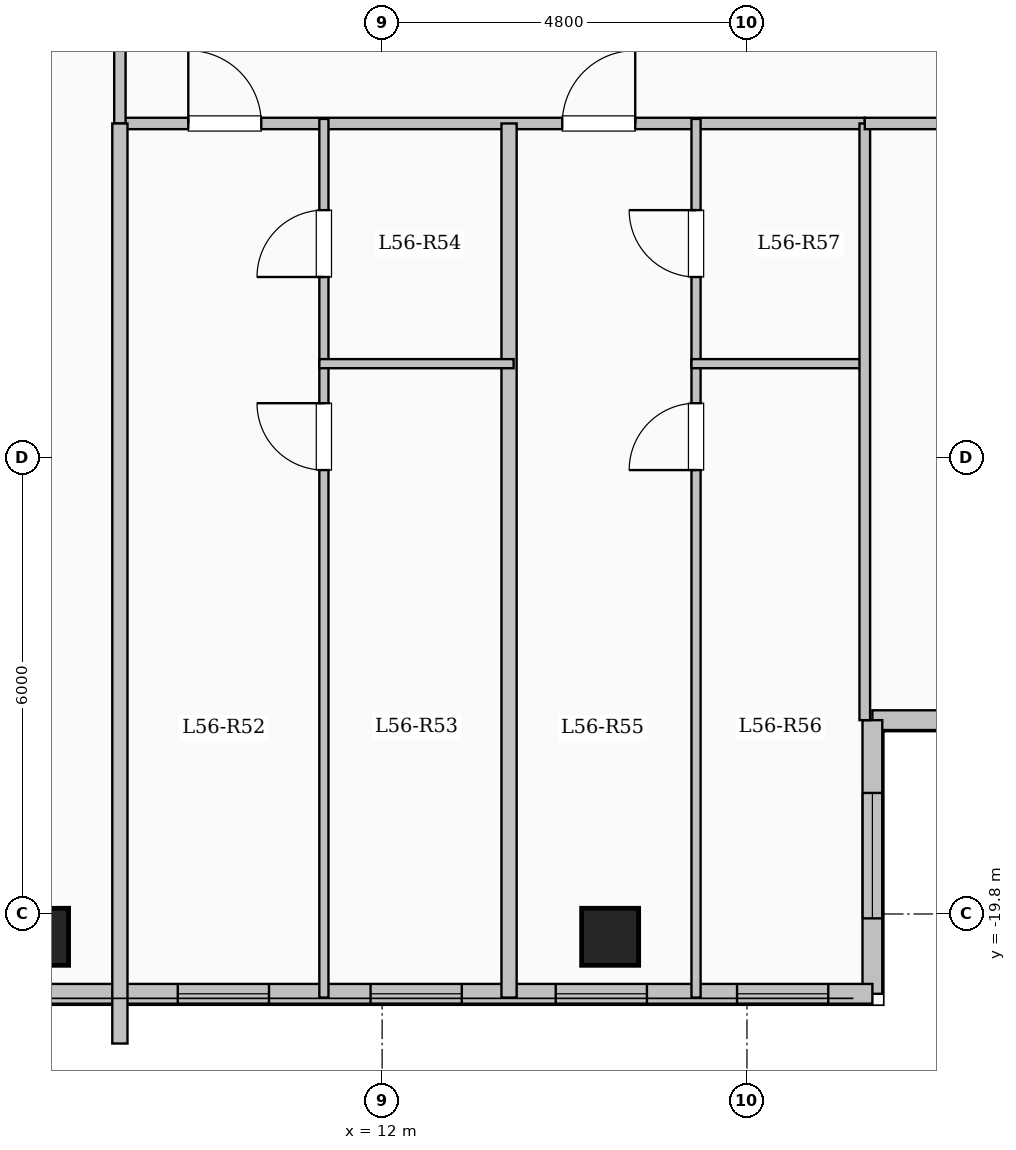
"""IFC4 building model, lengths in metres.
Left out: names, types, materials, properties, quantities, classifications, styles, units other than length and angle.
Written with IfcOpenShell. Run it as: python <this file> out.ifc"""

import sys

from ifc_helpers import new_model, si_unit, direction, frame, frame_2d, origin, origin_2d, place, context, subcontext, project, spatial, rectangle, extrude, element, fill, save


model = new_model("IFC4")
c1 = context("Model", 3, precision=1e-05, world=origin(), true_north=direction((0.0, 1.0)))
c2 = subcontext(c1, "Body", "Model", "MODEL_VIEW")
j1 = project(units=[si_unit("LENGTHUNIT", "METRE"), si_unit("PLANEANGLEUNIT", "RADIAN")], contexts=[c1])
p1 = place(None, origin())
s1 = spatial("IfcSite", under=j1, at=p1, CompositionType="ELEMENT")
p2 = place(p1, origin())
s2 = spatial("IfcBuilding", under=s1, at=p2, CompositionType="ELEMENT")
p3 = place(p2, frame((0.0, 0.0, 207.0)))
s3 = spatial("IfcBuildingStorey", under=s2, at=p3, CompositionType="ELEMENT", Elevation=207.0)
for number, where, z_axis, x_axis in (
    (1, (7.5, -20.1, 0.0), (0.0, 0.0, 1.0), (1.0, 0.0, 0.0)),
    (2, (15.0, -20.1, 0.0), (0.0, 0.0, 1.0), (1.0, 0.0, 0.0)),
):
    element("IfcColumn", number, at=place(p3, frame(where, z_axis=z_axis, x_axis=x_axis)), inside=s3, PredefinedType="COLUMN", context=c2, shape_type="SweptSolid", body=[
        extrude(rectangle(XDim=0.75, YDim=0.75, at=origin_2d()), origin(), (0.0, 0.0, 1.0), 3.35),
    ])
p4 = place(p3, frame((23.55, -17.25, 0.0), z_axis=(0.0, 0.0, 1.0), x_axis=(-1.0, 0.0, 0.0)))
e3 = element("IfcWall", 3, at=p4, inside=s3, PredefinedType="SOLIDWALL", context=c2, shape_type="SweptSolid", body=[
    extrude(rectangle(XDim=5.1, YDim=0.26, at=frame_2d((2.55, 0.0))), origin(), (0.0, 0.0, 1.0), 3.1),
])
p5 = place(p4, frame((1.475, 0.0, 0.9)))
e4 = element("IfcOpeningElement", 4, at=p5, cuts=e3, PredefinedType="OPENING", context=c2, shape_type="SweptSolid", body=[
    extrude(rectangle(XDim=2.2, YDim=1.75, at=frame_2d((1.1, 0.875))), frame((0.0, 0.14, 0.0), z_axis=(0.0, -1.0, 0.0), x_axis=(1.0, 0.0, 0.0)), (0.0, 0.0, 1.0), 0.28),
])
p6 = place(p3, frame((18.45, -17.25, 0.0), z_axis=(0.0, 0.0, 1.0), x_axis=(0.0, -1.0, 0.0)))
e5 = element("IfcWall", 5, at=p6, inside=s3, PredefinedType="SOLIDWALL", context=c2, shape_type="SweptSolid", body=[
    extrude(rectangle(XDim=3.6, YDim=0.26, at=frame_2d((1.8, 0.0))), origin(), (0.0, 0.0, 1.0), 3.1),
])
p7 = place(p6, frame((0.958, 0.0, 0.9)))
e6 = element("IfcOpeningElement", 6, at=p7, cuts=e5, PredefinedType="OPENING", context=c2, shape_type="SweptSolid", body=[
    extrude(rectangle(XDim=1.65, YDim=1.6, at=frame_2d((0.825, 0.8))), frame((0.0, 0.14, 0.0), z_axis=(0.0, -1.0, 0.0), x_axis=(1.0, 0.0, 0.0)), (0.0, 0.0, 1.0), 0.28),
])
p8 = place(p3, frame((18.45, -20.85, 0.0), z_axis=(0.0, 0.0, 1.0), x_axis=(-1.0, 0.0, 0.0)))
e7 = element("IfcWall", 7, at=p8, inside=s3, PredefinedType="SOLIDWALL", context=c2, shape_type="SweptSolid", body=[
    extrude(rectangle(XDim=11.1, YDim=0.26, at=frame_2d((5.55, 0.0))), origin(), (0.0, 0.0, 1.0), 3.1),
])
p9 = place(p8, frame((0.581, 0.0, 0.95)))
e8 = element("IfcOpeningElement", 8, at=p9, cuts=e7, PredefinedType="OPENING", context=c2, shape_type="SweptSolid", body=[
    extrude(rectangle(XDim=1.2, YDim=1.5, at=frame_2d((0.6, 0.75))), frame((0.0, 0.14, 0.0), z_axis=(0.0, -1.0, 0.0), x_axis=(1.0, 0.0, 0.0)), (0.0, 0.0, 1.0), 0.28),
])
p10 = place(p8, frame((2.966, 0.0, 0.95)))
e9 = element("IfcOpeningElement", 9, at=p10, cuts=e7, PredefinedType="OPENING", context=c2, shape_type="SweptSolid", body=[
    extrude(rectangle(XDim=1.2, YDim=1.5, at=frame_2d((0.6, 0.75))), frame((0.0, 0.14, 0.0), z_axis=(0.0, -1.0, 0.0), x_axis=(1.0, 0.0, 0.0)), (0.0, 0.0, 1.0), 0.28),
])
p11 = place(p8, frame((5.402, 0.0, 0.95)))
e10 = element("IfcOpeningElement", 10, at=p11, cuts=e7, PredefinedType="OPENING", context=c2, shape_type="SweptSolid", body=[
    extrude(rectangle(XDim=1.2, YDim=1.5, at=frame_2d((0.6, 0.75))), frame((0.0, 0.14, 0.0), z_axis=(0.0, -1.0, 0.0), x_axis=(1.0, 0.0, 0.0)), (0.0, 0.0, 1.0), 0.28),
])
p12 = place(p8, frame((7.938, 0.0, 0.95)))
e11 = element("IfcOpeningElement", 11, at=p12, cuts=e7, PredefinedType="OPENING", context=c2, shape_type="SweptSolid", body=[
    extrude(rectangle(XDim=1.2, YDim=1.5, at=frame_2d((0.6, 0.75))), frame((0.0, 0.14, 0.0), z_axis=(0.0, -1.0, 0.0), x_axis=(1.0, 0.0, 0.0)), (0.0, 0.0, 1.0), 0.28),
])
p13 = place(p3, frame((8.55, -9.4, 0.0), z_axis=(0.0, 0.0, 1.0), x_axis=(1.0, 0.0, 0.0)))
e12 = element("IfcWall", 12, at=p13, inside=s3, PredefinedType="PARTITIONING", context=c2, shape_type="SweptSolid", body=[
    extrude(rectangle(XDim=9.8, YDim=0.15, at=frame_2d((4.9, 0.0))), origin(), (0.0, 0.0, 1.0), 3.1),
])
p14 = place(p13, frame((0.9, 0.0, 0.0)))
e13 = element("IfcOpeningElement", 13, at=p14, cuts=e12, PredefinedType="OPENING", context=c2, shape_type="SweptSolid", body=[
    extrude(rectangle(XDim=0.96, YDim=2.15, at=frame_2d((0.48, 1.075))), frame((0.0, 0.085, 0.0), z_axis=(0.0, -1.0, 0.0), x_axis=(1.0, 0.0, 0.0)), (0.0, 0.0, 1.0), 0.17),
])
p15 = place(p13, frame((5.82, 0.0, 0.0)))
e14 = element("IfcOpeningElement", 14, at=p15, cuts=e12, PredefinedType="OPENING", context=c2, shape_type="SweptSolid", body=[
    extrude(rectangle(XDim=0.96, YDim=2.15, at=frame_2d((0.48, 1.075))), frame((0.0, 0.085, 0.0), z_axis=(0.0, -1.0, 0.0), x_axis=(1.0, 0.0, 0.0)), (0.0, 0.0, 1.0), 0.17),
])
p16 = place(p3, frame((8.55, -9.4, 0.0), z_axis=(0.0, 0.0, 1.0), x_axis=(0.0, 1.0, 0.0)))
e15 = element("IfcWall", 15, at=p16, inside=s3, PredefinedType="PARTITIONING", context=c2, shape_type="SweptSolid", body=[
    extrude(rectangle(XDim=2.15, YDim=0.15, at=frame_2d((1.075, 0.0))), origin(), (0.0, 0.0, 1.0), 3.1),
])
p17 = place(p3, frame((13.67, -20.9, 0.0), z_axis=(0.0, 0.0, 1.0), x_axis=(0.0, 1.0, 0.0)))
e16 = element("IfcWall", 16, at=p17, inside=s3, PredefinedType="SOLIDWALL", context=c2, shape_type="SweptSolid", body=[
    extrude(rectangle(XDim=11.5, YDim=0.2, at=frame_2d((5.75, 0.0))), origin(), (0.0, 0.0, 1.0), 3.1),
])
p18 = place(p3, frame((11.234, -20.9, 0.0), z_axis=(0.0, 0.0, 1.0), x_axis=(0.0, 1.0, 0.0)))
e17 = element("IfcWall", 17, at=p18, inside=s3, PredefinedType="PARTITIONING", context=c2, shape_type="SweptSolid", body=[
    extrude(rectangle(XDim=8.34, YDim=0.12, at=frame_2d((4.17, 0.0))), origin(), (0.0, 0.0, 1.0), 3.1),
])
p19 = place(p18, frame((6.94, 0.0, 0.0)))
e18 = element("IfcOpeningElement", 18, at=p19, cuts=e17, PredefinedType="OPENING", context=c2, shape_type="SweptSolid", body=[
    extrude(rectangle(XDim=0.88, YDim=2.1, at=frame_2d((0.44, 1.05))), frame((0.0, 0.07, 0.0), z_axis=(0.0, -1.0, 0.0), x_axis=(1.0, 0.0, 0.0)), (0.0, 0.0, 1.0), 0.14),
])
p20 = place(p3, frame((11.234, -12.56, 0.0), z_axis=(0.0, 0.0, 1.0), x_axis=(0.0, 1.0, 0.0)))
e19 = element("IfcWall", 19, at=p20, inside=s3, PredefinedType="PARTITIONING", context=c2, shape_type="SweptSolid", body=[
    extrude(rectangle(XDim=3.22, YDim=0.12, at=frame_2d((1.61, 0.0))), origin(), (0.0, 0.0, 1.0), 3.1),
])
p21 = place(p20, frame((1.14, 0.0, 0.0)))
e20 = element("IfcOpeningElement", 20, at=p21, cuts=e19, PredefinedType="OPENING", context=c2, shape_type="SweptSolid", body=[
    extrude(rectangle(XDim=0.88, YDim=2.1, at=frame_2d((0.44, 1.05))), frame((0.0, 0.07, 0.0), z_axis=(0.0, -1.0, 0.0), x_axis=(1.0, 0.0, 0.0)), (0.0, 0.0, 1.0), 0.14),
])
p22 = place(p3, frame((11.174, -12.56, 0.0), z_axis=(0.0, 0.0, 1.0), x_axis=(1.0, 0.0, 0.0)))
e21 = element("IfcWall", 21, at=p22, inside=s3, PredefinedType="PARTITIONING", context=c2, shape_type="SweptSolid", body=[
    extrude(rectangle(XDim=2.556, YDim=0.12, at=frame_2d((1.278, 0.0))), origin(), (0.0, 0.0, 1.0), 2.725),
])
p23 = place(p3, frame((16.13, -20.9, 0.0), z_axis=(0.0, 0.0, 1.0), x_axis=(0.0, 1.0, 0.0)))
e22 = element("IfcWall", 22, at=p23, inside=s3, PredefinedType="PARTITIONING", context=c2, shape_type="SweptSolid", body=[
    extrude(rectangle(XDim=8.34, YDim=0.12, at=frame_2d((4.17, 0.0))), origin(), (0.0, 0.0, 1.0), 3.1),
])
p24 = place(p23, frame((6.94, 0.0, 0.0)))
e23 = element("IfcOpeningElement", 23, at=p24, cuts=e22, PredefinedType="OPENING", context=c2, shape_type="SweptSolid", body=[
    extrude(rectangle(XDim=0.88, YDim=2.1, at=frame_2d((0.44, 1.05))), frame((0.0, 0.07, 0.0), z_axis=(0.0, -1.0, 0.0), x_axis=(1.0, 0.0, 0.0)), (0.0, 0.0, 1.0), 0.14),
])
p25 = place(p3, frame((16.13, -12.56, 0.0), z_axis=(0.0, 0.0, 1.0), x_axis=(0.0, 1.0, 0.0)))
e24 = element("IfcWall", 24, at=p25, inside=s3, PredefinedType="PARTITIONING", context=c2, shape_type="SweptSolid", body=[
    extrude(rectangle(XDim=3.22, YDim=0.12, at=frame_2d((1.61, 0.0))), origin(), (0.0, 0.0, 1.0), 3.1),
])
p26 = place(p25, frame((1.14, 0.0, 0.0)))
e25 = element("IfcOpeningElement", 25, at=p26, cuts=e24, PredefinedType="OPENING", context=c2, shape_type="SweptSolid", body=[
    extrude(rectangle(XDim=0.88, YDim=2.1, at=frame_2d((0.44, 1.05))), frame((0.0, 0.07, 0.0), z_axis=(0.0, -1.0, 0.0), x_axis=(1.0, 0.0, 0.0)), (0.0, 0.0, 1.0), 0.14),
])
p27 = place(p3, frame((16.07, -12.56, 0.0), z_axis=(0.0, 0.0, 1.0), x_axis=(1.0, 0.0, 0.0)))
e26 = element("IfcWall", 26, at=p27, inside=s3, PredefinedType="PARTITIONING", context=c2, shape_type="SweptSolid", body=[
    extrude(rectangle(XDim=2.34, YDim=0.12, at=frame_2d((1.17, 0.0))), origin(), (0.0, 0.0, 1.0), 3.1),
])
p28 = place(p3, frame((8.55, -21.504, 0.0), z_axis=(0.0, 0.0, 1.0), x_axis=(0.0, 1.0, 0.0)))
e27 = element("IfcWall", 27, at=p28, inside=s3, PredefinedType="SOLIDWALL", context=c2, shape_type="SweptSolid", body=[
    extrude(rectangle(XDim=12.104, YDim=0.2, at=frame_2d((6.052, 0.0))), origin(), (0.0, 0.0, 1.0), 3.1),
])
p29 = place(p3, frame((18.35, -17.25, 0.0), z_axis=(0.0, 0.0, 1.0), x_axis=(0.0, 1.0, 0.0)))
e28 = element("IfcWall", 28, at=p29, inside=s3, PredefinedType="PARTITIONING", context=c2, shape_type="SweptSolid", body=[
    extrude(rectangle(XDim=7.85, YDim=0.14, at=frame_2d((3.925, 0.0))), origin(), (0.0, 0.0, 1.0), 3.1),
])
p30 = place(p3, frame((18.35, -9.4, 0.0), z_axis=(0.0, 0.0, 1.0), x_axis=(1.0, 0.0, 0.0)))
e29 = element("IfcWall", 29, at=p30, inside=s3, PredefinedType="PARTITIONING", context=c2, shape_type="SweptSolid", body=[
    extrude(rectangle(XDim=5.23, YDim=0.15, at=frame_2d((2.615, 0.0))), origin(), (0.0, 0.0, 1.0), 3.1),
])
p31 = place(p30, frame((2.14, 0.0, 0.0)))
e30 = element("IfcOpeningElement", 30, at=p31, cuts=e29, PredefinedType="OPENING", context=c2, shape_type="SweptSolid", body=[
    extrude(rectangle(XDim=0.95, YDim=2.15, at=frame_2d((0.475, 1.075))), frame((0.0, 0.085, 0.0), z_axis=(0.0, -1.0, 0.0), x_axis=(1.0, 0.0, 0.0)), (0.0, 0.0, 1.0), 0.17),
])
p32 = place(p7, origin())
e31 = element("IfcWindow", 31, at=p32, inside=s3, PartitioningType="SINGLE_PANEL", PredefinedType="WINDOW", context=c2, shape_type="SweptSolid", body=[
    extrude(rectangle(XDim=1.65, YDim=1.6, at=frame_2d((0.825, 0.8))), frame((0.0, 0.03, 0.0), z_axis=(0.0, -1.0, 0.0), x_axis=(1.0, 0.0, 0.0)), (0.0, 0.0, 1.0), 0.06),
])
fill(e6, e31)
p33 = place(p9, origin())
e32 = element("IfcWindow", 32, at=p33, inside=s3, PartitioningType="SINGLE_PANEL", PredefinedType="WINDOW", context=c2, shape_type="SweptSolid", body=[
    extrude(rectangle(XDim=1.2, YDim=1.5, at=frame_2d((0.6, 0.75))), frame((0.0, 0.03, 0.0), z_axis=(0.0, -1.0, 0.0), x_axis=(1.0, 0.0, 0.0)), (0.0, 0.0, 1.0), 0.06),
])
fill(e8, e32)
p34 = place(p10, origin())
e33 = element("IfcWindow", 33, at=p34, inside=s3, PartitioningType="SINGLE_PANEL", PredefinedType="WINDOW", context=c2, shape_type="SweptSolid", body=[
    extrude(rectangle(XDim=1.2, YDim=1.5, at=frame_2d((0.6, 0.75))), frame((0.0, 0.03, 0.0), z_axis=(0.0, -1.0, 0.0), x_axis=(1.0, 0.0, 0.0)), (0.0, 0.0, 1.0), 0.06),
])
fill(e9, e33)
p35 = place(p11, origin())
e34 = element("IfcWindow", 34, at=p35, inside=s3, PartitioningType="SINGLE_PANEL", PredefinedType="WINDOW", context=c2, shape_type="SweptSolid", body=[
    extrude(rectangle(XDim=1.2, YDim=1.5, at=frame_2d((0.6, 0.75))), frame((0.0, 0.03, 0.0), z_axis=(0.0, -1.0, 0.0), x_axis=(1.0, 0.0, 0.0)), (0.0, 0.0, 1.0), 0.06),
])
fill(e10, e34)
p36 = place(p12, origin())
e35 = element("IfcWindow", 35, at=p36, inside=s3, PartitioningType="SINGLE_PANEL", PredefinedType="WINDOW", context=c2, shape_type="SweptSolid", body=[
    extrude(rectangle(XDim=1.2, YDim=1.5, at=frame_2d((0.6, 0.75))), frame((0.0, 0.03, 0.0), z_axis=(0.0, -1.0, 0.0), x_axis=(1.0, 0.0, 0.0)), (0.0, 0.0, 1.0), 0.06),
])
fill(e11, e35)
p37 = place(p14, origin())
e36 = element("IfcDoor", 36, at=p37, inside=s3, OperationType="SINGLE_SWING_LEFT", PredefinedType="DOOR", context=c2, shape_type="SweptSolid", body=[
    extrude(rectangle(XDim=0.96, YDim=2.15, at=frame_2d((0.48, 1.075))), frame((0.0, 0.025, 0.0), z_axis=(0.0, -1.0, 0.0), x_axis=(1.0, 0.0, 0.0)), (0.0, 0.0, 1.0), 0.05),
])
fill(e13, e36)
p38 = place(p19, origin())
e37 = element("IfcDoor", 37, at=p38, inside=s3, OperationType="SINGLE_SWING_RIGHT", PredefinedType="DOOR", context=c2, shape_type="SweptSolid", body=[
    extrude(rectangle(XDim=0.88, YDim=2.1, at=frame_2d((0.44, 1.05))), frame((0.0, 0.025, 0.0), z_axis=(0.0, -1.0, 0.0), x_axis=(1.0, 0.0, 0.0)), (0.0, 0.0, 1.0), 0.05),
])
fill(e18, e37)
p39 = place(p21, origin())
e38 = element("IfcDoor", 38, at=p39, inside=s3, OperationType="SINGLE_SWING_LEFT", PredefinedType="DOOR", context=c2, shape_type="SweptSolid", body=[
    extrude(rectangle(XDim=0.88, YDim=2.1, at=frame_2d((0.44, 1.05))), frame((0.0, 0.025, 0.0), z_axis=(0.0, -1.0, 0.0), x_axis=(1.0, 0.0, 0.0)), (0.0, 0.0, 1.0), 0.05),
])
fill(e20, e38)
p40 = place(p15, origin())
e39 = element("IfcDoor", 39, at=p40, inside=s3, OperationType="SINGLE_SWING_RIGHT", PredefinedType="DOOR", context=c2, shape_type="SweptSolid", body=[
    extrude(rectangle(XDim=0.96, YDim=2.15, at=frame_2d((0.48, 1.075))), frame((0.0, 0.025, 0.0), z_axis=(0.0, -1.0, 0.0), x_axis=(1.0, 0.0, 0.0)), (0.0, 0.0, 1.0), 0.05),
])
fill(e14, e39)
p41 = place(p24, origin())
e40 = element("IfcDoor", 40, at=p41, inside=s3, OperationType="SINGLE_SWING_LEFT", PredefinedType="DOOR", context=c2, shape_type="SweptSolid", body=[
    extrude(rectangle(XDim=0.88, YDim=2.1, at=frame_2d((0.44, 1.05))), frame((0.0, 0.025, 0.0), z_axis=(0.0, -1.0, 0.0), x_axis=(1.0, 0.0, 0.0)), (0.0, 0.0, 1.0), 0.05),
])
fill(e23, e40)
p42 = place(p26, origin())
e41 = element("IfcDoor", 41, at=p42, inside=s3, OperationType="SINGLE_SWING_RIGHT", PredefinedType="DOOR", context=c2, shape_type="SweptSolid", body=[
    extrude(rectangle(XDim=0.88, YDim=2.1, at=frame_2d((0.44, 1.05))), frame((0.0, 0.025, 0.0), z_axis=(0.0, -1.0, 0.0), x_axis=(1.0, 0.0, 0.0)), (0.0, 0.0, 1.0), 0.05),
])
fill(e25, e41)
save(model, sys.argv[1])
